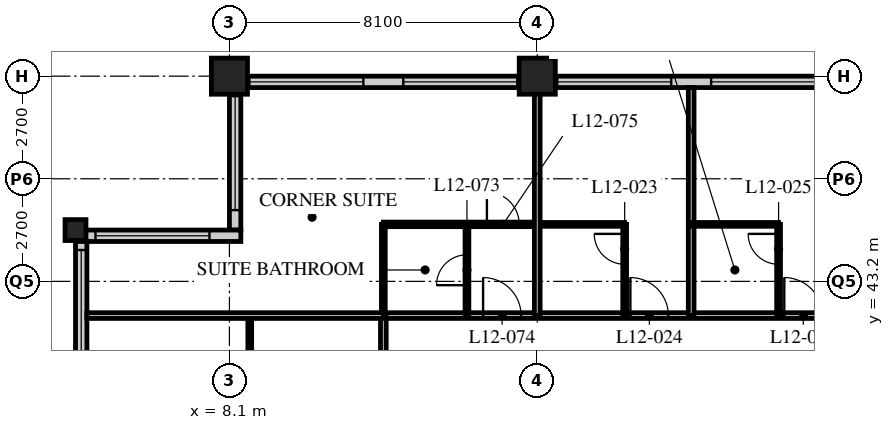
"""IFC4 building model, lengths in metres.
Left out: names, types, materials, properties, quantities, classifications, styles, units other than length and angle.
Written with IfcOpenShell. Run it as: python <this file> out.ifc"""

import sys

from ifc_helpers import new_model, si_unit, direction, frame, frame_2d, origin, origin_2d, place, context, subcontext, project, spatial, rectangle, hollow_rectangle, extrude, element, fill, save


model = new_model("IFC4")
c1 = context("Model", 3, precision=1e-05, world=origin(), true_north=direction((0.0, 1.0)))
c2 = subcontext(c1, "Body", "Model", "MODEL_VIEW")
j1 = project(units=[si_unit("LENGTHUNIT", "METRE"), si_unit("PLANEANGLEUNIT", "RADIAN")], contexts=[c1])
p1 = place(None, origin())
s1 = spatial("IfcSite", under=j1, at=p1, CompositionType="ELEMENT")
p2 = place(p1, origin())
s2 = spatial("IfcBuilding", under=s1, at=p2, CompositionType="ELEMENT")
p3 = place(p2, frame((0.0, 0.0, 53.4)))
s3 = spatial("IfcBuildingStorey", under=s2, at=p3, CompositionType="ELEMENT", Elevation=53.4)
p4 = place(p3, frame((4.05, 44.55, 0.0), z_axis=(0.0, 0.0, 1.0), x_axis=(1.0, 0.0, 0.0)))
e1 = element("IfcColumn", 1, at=p4, inside=s3, PredefinedType="COLUMN", context=c2, shape_type="SweptSolid", body=[
    extrude(hollow_rectangle(XDim=0.55, YDim=0.55, WallThickness=0.05, at=origin_2d()), origin(), (0.0, 0.0, 1.0), 3.4),
])
for number, where, z_axis, x_axis in (
    (2, (8.1, 48.6, 0.0), (0.0, 0.0, 1.0), (1.0, 0.0, 0.0)),
    (3, (16.2, 48.6, 0.0), (0.0, 0.0, 1.0), (1.0, 0.0, 0.0)),
):
    element("IfcColumn", number, at=place(p3, frame(where, z_axis=z_axis, x_axis=x_axis)), inside=s3, PredefinedType="COLUMN", context=c2, shape_type="SweptSolid", body=[
        extrude(hollow_rectangle(XDim=0.95, YDim=0.95, WallThickness=0.095, at=origin_2d()), origin(), (0.0, 0.0, 1.0), 3.4),
    ])
p5 = place(p3, frame((48.3, 48.45, 0.0), z_axis=(0.0, 0.0, 1.0), x_axis=(-1.0, 0.0, 0.0)))
e4 = element("IfcWall", 4, at=p5, inside=s3, PredefinedType="SOLIDWALL", context=c2, shape_type="SweptSolid", body=[
    extrude(rectangle(XDim=40.2, YDim=0.3, at=frame_2d((20.1, 0.0))), origin(), (0.0, 0.0, 1.0), 3.19),
])
p6 = place(p5, frame((0.225, 0.0, 0.9)))
e5 = element("IfcOpeningElement", 5, at=p6, cuts=e4, PredefinedType="OPENING", context=c2, shape_type="SweptSolid", body=[
    extrude(rectangle(XDim=3.0, YDim=2.0, at=frame_2d((1.5, 1.0))), frame((0.0, 0.16, 0.0), z_axis=(0.0, -1.0, 0.0), x_axis=(1.0, 0.0, 0.0)), (0.0, 0.0, 1.0), 0.32),
])
p7 = place(p5, frame((4.275, 0.0, 0.9)))
e6 = element("IfcOpeningElement", 6, at=p7, cuts=e4, PredefinedType="OPENING", context=c2, shape_type="SweptSolid", body=[
    extrude(rectangle(XDim=3.0, YDim=2.0, at=frame_2d((1.5, 1.0))), frame((0.0, 0.16, 0.0), z_axis=(0.0, -1.0, 0.0), x_axis=(1.0, 0.0, 0.0)), (0.0, 0.0, 1.0), 0.32),
])
p8 = place(p5, frame((8.325, 0.0, 0.9)))
e7 = element("IfcOpeningElement", 7, at=p8, cuts=e4, PredefinedType="OPENING", context=c2, shape_type="SweptSolid", body=[
    extrude(rectangle(XDim=3.0, YDim=2.0, at=frame_2d((1.5, 1.0))), frame((0.0, 0.16, 0.0), z_axis=(0.0, -1.0, 0.0), x_axis=(1.0, 0.0, 0.0)), (0.0, 0.0, 1.0), 0.32),
])
p9 = place(p5, frame((12.375, 0.0, 0.9)))
e8 = element("IfcOpeningElement", 8, at=p9, cuts=e4, PredefinedType="OPENING", context=c2, shape_type="SweptSolid", body=[
    extrude(rectangle(XDim=3.0, YDim=2.0, at=frame_2d((1.5, 1.0))), frame((0.0, 0.16, 0.0), z_axis=(0.0, -1.0, 0.0), x_axis=(1.0, 0.0, 0.0)), (0.0, 0.0, 1.0), 0.32),
])
p10 = place(p5, frame((16.425, 0.0, 0.9)))
e9 = element("IfcOpeningElement", 9, at=p10, cuts=e4, PredefinedType="OPENING", context=c2, shape_type="SweptSolid", body=[
    extrude(rectangle(XDim=3.0, YDim=2.0, at=frame_2d((1.5, 1.0))), frame((0.0, 0.16, 0.0), z_axis=(0.0, -1.0, 0.0), x_axis=(1.0, 0.0, 0.0)), (0.0, 0.0, 1.0), 0.32),
])
p11 = place(p5, frame((20.475, 0.0, 0.9)))
e10 = element("IfcOpeningElement", 10, at=p11, cuts=e4, PredefinedType="OPENING", context=c2, shape_type="SweptSolid", body=[
    extrude(rectangle(XDim=3.0, YDim=2.0, at=frame_2d((1.5, 1.0))), frame((0.0, 0.16, 0.0), z_axis=(0.0, -1.0, 0.0), x_axis=(1.0, 0.0, 0.0)), (0.0, 0.0, 1.0), 0.32),
])
p12 = place(p5, frame((24.525, 0.0, 0.9)))
e11 = element("IfcOpeningElement", 11, at=p12, cuts=e4, PredefinedType="OPENING", context=c2, shape_type="SweptSolid", body=[
    extrude(rectangle(XDim=3.0, YDim=2.0, at=frame_2d((1.5, 1.0))), frame((0.0, 0.16, 0.0), z_axis=(0.0, -1.0, 0.0), x_axis=(1.0, 0.0, 0.0)), (0.0, 0.0, 1.0), 0.32),
])
p13 = place(p5, frame((28.575, 0.0, 0.9)))
e12 = element("IfcOpeningElement", 12, at=p13, cuts=e4, PredefinedType="OPENING", context=c2, shape_type="SweptSolid", body=[
    extrude(rectangle(XDim=3.0, YDim=2.0, at=frame_2d((1.5, 1.0))), frame((0.0, 0.16, 0.0), z_axis=(0.0, -1.0, 0.0), x_axis=(1.0, 0.0, 0.0)), (0.0, 0.0, 1.0), 0.32),
])
p14 = place(p5, frame((32.625, 0.0, 0.9)))
e13 = element("IfcOpeningElement", 13, at=p14, cuts=e4, PredefinedType="OPENING", context=c2, shape_type="SweptSolid", body=[
    extrude(rectangle(XDim=3.0, YDim=2.0, at=frame_2d((1.5, 1.0))), frame((0.0, 0.16, 0.0), z_axis=(0.0, -1.0, 0.0), x_axis=(1.0, 0.0, 0.0)), (0.0, 0.0, 1.0), 0.32),
])
p15 = place(p5, frame((36.675, 0.0, 0.9)))
e14 = element("IfcOpeningElement", 14, at=p15, cuts=e4, PredefinedType="OPENING", context=c2, shape_type="SweptSolid", body=[
    extrude(rectangle(XDim=3.0, YDim=2.0, at=frame_2d((1.5, 1.0))), frame((0.0, 0.16, 0.0), z_axis=(0.0, -1.0, 0.0), x_axis=(1.0, 0.0, 0.0)), (0.0, 0.0, 1.0), 0.32),
])
p16 = place(p3, frame((8.25, 48.3, 0.0), z_axis=(0.0, 0.0, 1.0), x_axis=(0.0, -1.0, 0.0)))
e15 = element("IfcWall", 15, at=p16, inside=s3, PredefinedType="SOLIDWALL", context=c2, shape_type="SweptSolid", body=[
    extrude(rectangle(XDim=3.75, YDim=0.3, at=frame_2d((1.875, 0.0))), origin(), (0.0, 0.0, 1.0), 3.19),
])
p17 = place(p16, frame((0.225, 0.0, 0.9)))
e16 = element("IfcOpeningElement", 16, at=p17, cuts=e15, PredefinedType="OPENING", context=c2, shape_type="SweptSolid", body=[
    extrude(rectangle(XDim=3.0, YDim=1.5, at=frame_2d((1.5, 0.75))), frame((0.0, 0.16, 0.0), z_axis=(0.0, -1.0, 0.0), x_axis=(1.0, 0.0, 0.0)), (0.0, 0.0, 1.0), 0.32),
])
p18 = place(p3, frame((8.4, 44.4, 0.0), z_axis=(0.0, 0.0, 1.0), x_axis=(-1.0, 0.0, 0.0)))
e17 = element("IfcWall", 17, at=p18, inside=s3, PredefinedType="SOLIDWALL", context=c2, shape_type="SweptSolid", body=[
    extrude(rectangle(XDim=4.35, YDim=0.3, at=frame_2d((2.175, 0.0))), origin(), (0.0, 0.0, 1.0), 3.19),
])
p19 = place(p18, frame((0.825, 0.0, 0.9)))
e18 = element("IfcOpeningElement", 18, at=p19, cuts=e17, PredefinedType="OPENING", context=c2, shape_type="SweptSolid", body=[
    extrude(rectangle(XDim=3.0, YDim=1.5, at=frame_2d((1.5, 0.75))), frame((0.0, 0.16, 0.0), z_axis=(0.0, -1.0, 0.0), x_axis=(1.0, 0.0, 0.0)), (0.0, 0.0, 1.0), 0.32),
])
p20 = place(p3, frame((4.2, 44.25, 0.0), z_axis=(0.0, 0.0, 1.0), x_axis=(0.0, -1.0, 0.0)))
e19 = element("IfcWall", 19, at=p20, inside=s3, PredefinedType="SOLIDWALL", context=c2, shape_type="SweptSolid", body=[
    extrude(rectangle(XDim=3.75, YDim=0.3, at=frame_2d((1.875, 0.0))), origin(), (0.0, 0.0, 1.0), 3.19),
])
p21 = place(p20, frame((0.225, 0.0, 0.9)))
e20 = element("IfcOpeningElement", 20, at=p21, cuts=e19, PredefinedType="OPENING", context=c2, shape_type="SweptSolid", body=[
    extrude(rectangle(XDim=3.0, YDim=1.5, at=frame_2d((1.5, 0.75))), frame((0.0, 0.16, 0.0), z_axis=(0.0, -1.0, 0.0), x_axis=(1.0, 0.0, 0.0)), (0.0, 0.0, 1.0), 0.32),
])
p22 = place(p3, frame((12.15, 42.3, 0.0), z_axis=(0.0, 0.0, 1.0), x_axis=(1.0, 0.0, 0.0)))
e21 = element("IfcWall", 21, at=p22, inside=s3, PredefinedType="PARTITIONING", context=c2, shape_type="SweptSolid", body=[
    extrude(rectangle(XDim=32.4, YDim=0.15, at=frame_2d((16.2, 0.0))), origin(), (0.0, 0.0, 1.0), 3.19),
])
p23 = place(p22, frame((6.5, 0.0, 0.0)))
e22 = element("IfcOpeningElement", 22, at=p23, cuts=e21, PredefinedType="OPENING", context=c2, shape_type="SweptSolid", body=[
    extrude(rectangle(XDim=1.0, YDim=2.1, at=frame_2d((0.5, 1.05))), frame((0.0, 0.085, 0.0), z_axis=(0.0, -1.0, 0.0), x_axis=(1.0, 0.0, 0.0)), (0.0, 0.0, 1.0), 0.17),
])
p24 = place(p22, frame((10.55, 0.0, 0.0)))
e23 = element("IfcOpeningElement", 23, at=p24, cuts=e21, PredefinedType="OPENING", context=c2, shape_type="SweptSolid", body=[
    extrude(rectangle(XDim=1.0, YDim=2.1, at=frame_2d((0.5, 1.05))), frame((0.0, 0.085, 0.0), z_axis=(0.0, -1.0, 0.0), x_axis=(1.0, 0.0, 0.0)), (0.0, 0.0, 1.0), 0.17),
])
p25 = place(p22, frame((14.6, 0.0, 0.0)))
e24 = element("IfcOpeningElement", 24, at=p25, cuts=e21, PredefinedType="OPENING", context=c2, shape_type="SweptSolid", body=[
    extrude(rectangle(XDim=1.0, YDim=2.1, at=frame_2d((0.5, 1.05))), frame((0.0, 0.085, 0.0), z_axis=(0.0, -1.0, 0.0), x_axis=(1.0, 0.0, 0.0)), (0.0, 0.0, 1.0), 0.17),
])
p26 = place(p22, frame((18.65, 0.0, 0.0)))
e25 = element("IfcOpeningElement", 25, at=p26, cuts=e21, PredefinedType="OPENING", context=c2, shape_type="SweptSolid", body=[
    extrude(rectangle(XDim=1.0, YDim=2.1, at=frame_2d((0.5, 1.05))), frame((0.0, 0.085, 0.0), z_axis=(0.0, -1.0, 0.0), x_axis=(1.0, 0.0, 0.0)), (0.0, 0.0, 1.0), 0.17),
])
p27 = place(p22, frame((22.7, 0.0, 0.0)))
e26 = element("IfcOpeningElement", 26, at=p27, cuts=e21, PredefinedType="OPENING", context=c2, shape_type="SweptSolid", body=[
    extrude(rectangle(XDim=1.0, YDim=2.1, at=frame_2d((0.5, 1.05))), frame((0.0, 0.085, 0.0), z_axis=(0.0, -1.0, 0.0), x_axis=(1.0, 0.0, 0.0)), (0.0, 0.0, 1.0), 0.17),
])
p28 = place(p22, frame((26.75, 0.0, 0.0)))
e27 = element("IfcOpeningElement", 27, at=p28, cuts=e21, PredefinedType="OPENING", context=c2, shape_type="SweptSolid", body=[
    extrude(rectangle(XDim=1.0, YDim=2.1, at=frame_2d((0.5, 1.05))), frame((0.0, 0.085, 0.0), z_axis=(0.0, -1.0, 0.0), x_axis=(1.0, 0.0, 0.0)), (0.0, 0.0, 1.0), 0.17),
])
p29 = place(p22, frame((28.775, 0.0, 0.0)))
e28 = element("IfcOpeningElement", 28, at=p29, cuts=e21, PredefinedType="OPENING", context=c2, shape_type="SweptSolid", body=[
    extrude(rectangle(XDim=1.0, YDim=2.1, at=frame_2d((0.5, 1.05))), frame((0.0, 0.085, 0.0), z_axis=(0.0, -1.0, 0.0), x_axis=(1.0, 0.0, 0.0)), (0.0, 0.0, 1.0), 0.17),
])
p30 = place(p22, frame((2.625, 0.0, 0.0)))
e29 = element("IfcOpeningElement", 29, at=p30, cuts=e21, PredefinedType="OPENING", context=c2, shape_type="SweptSolid", body=[
    extrude(rectangle(XDim=1.0, YDim=2.1, at=frame_2d((0.5, 1.05))), frame((0.0, 0.085, 0.0), z_axis=(0.0, -1.0, 0.0), x_axis=(1.0, 0.0, 0.0)), (0.0, 0.0, 1.0), 0.17),
])
p31 = place(p3, frame((12.15, 12.15, 0.0), z_axis=(0.0, 0.0, 1.0), x_axis=(0.0, 1.0, 0.0)))
e30 = element("IfcWall", 30, at=p31, inside=s3, PredefinedType="PARTITIONING", context=c2, shape_type="SweptSolid", body=[
    extrude(rectangle(XDim=30.15, YDim=0.15, at=frame_2d((15.075, 0.0))), origin(), (0.0, 0.0, 1.0), 3.19),
])
p32 = place(p31, frame((2.45, 0.0, 0.0)))
e31 = element("IfcOpeningElement", 31, at=p32, cuts=e30, PredefinedType="OPENING", context=c2, shape_type="SweptSolid", body=[
    extrude(rectangle(XDim=1.0, YDim=2.1, at=frame_2d((0.5, 1.05))), frame((0.0, 0.085, 0.0), z_axis=(0.0, -1.0, 0.0), x_axis=(1.0, 0.0, 0.0)), (0.0, 0.0, 1.0), 0.17),
])
p33 = place(p31, frame((6.5, 0.0, 0.0)))
e32 = element("IfcOpeningElement", 32, at=p33, cuts=e30, PredefinedType="OPENING", context=c2, shape_type="SweptSolid", body=[
    extrude(rectangle(XDim=1.0, YDim=2.1, at=frame_2d((0.5, 1.05))), frame((0.0, 0.085, 0.0), z_axis=(0.0, -1.0, 0.0), x_axis=(1.0, 0.0, 0.0)), (0.0, 0.0, 1.0), 0.17),
])
p34 = place(p31, frame((10.55, 0.0, 0.0)))
e33 = element("IfcOpeningElement", 33, at=p34, cuts=e30, PredefinedType="OPENING", context=c2, shape_type="SweptSolid", body=[
    extrude(rectangle(XDim=1.0, YDim=2.1, at=frame_2d((0.5, 1.05))), frame((0.0, 0.085, 0.0), z_axis=(0.0, -1.0, 0.0), x_axis=(1.0, 0.0, 0.0)), (0.0, 0.0, 1.0), 0.17),
])
p35 = place(p31, frame((14.6, 0.0, 0.0)))
e34 = element("IfcOpeningElement", 34, at=p35, cuts=e30, PredefinedType="OPENING", context=c2, shape_type="SweptSolid", body=[
    extrude(rectangle(XDim=1.0, YDim=2.1, at=frame_2d((0.5, 1.05))), frame((0.0, 0.085, 0.0), z_axis=(0.0, -1.0, 0.0), x_axis=(1.0, 0.0, 0.0)), (0.0, 0.0, 1.0), 0.17),
])
p36 = place(p31, frame((21.65, 0.0, 0.0)))
e35 = element("IfcOpeningElement", 35, at=p36, cuts=e30, PredefinedType="OPENING", context=c2, shape_type="SweptSolid", body=[
    extrude(rectangle(XDim=1.0, YDim=2.1, at=frame_2d((0.5, 1.05))), frame((0.0, 0.085, 0.0), z_axis=(0.0, -1.0, 0.0), x_axis=(1.0, 0.0, 0.0)), (0.0, 0.0, 1.0), 0.17),
])
p37 = place(p31, frame((26.7, 0.0, 0.0)))
e36 = element("IfcOpeningElement", 36, at=p37, cuts=e30, PredefinedType="OPENING", context=c2, shape_type="SweptSolid", body=[
    extrude(rectangle(XDim=1.0, YDim=2.1, at=frame_2d((0.5, 1.05))), frame((0.0, 0.085, 0.0), z_axis=(0.0, -1.0, 0.0), x_axis=(1.0, 0.0, 0.0)), (0.0, 0.0, 1.0), 0.17),
])
p38 = place(p3, frame((16.2, 44.7, 0.0), z_axis=(0.0, 0.0, 1.0), x_axis=(1.0, 0.0, 0.0)))
e37 = element("IfcWall", 37, at=p38, inside=s3, PredefinedType="PARTITIONING", context=c2, shape_type="SweptSolid", body=[
    extrude(rectangle(XDim=2.3, YDim=0.1, at=frame_2d((1.15, 0.0))), origin(), (0.0, 0.0, 1.0), 3.19),
])
p39 = place(p3, frame((18.5, 42.3, 0.0), z_axis=(0.0, 0.0, 1.0), x_axis=(0.0, 1.0, 0.0)))
e38 = element("IfcWall", 38, at=p39, inside=s3, PredefinedType="PARTITIONING", context=c2, shape_type="SweptSolid", body=[
    extrude(rectangle(XDim=2.4, YDim=0.1, at=frame_2d((1.2, 0.0))), origin(), (0.0, 0.0, 1.0), 3.19),
])
p40 = place(p39, frame((1.35, 0.0, 0.0)))
e39 = element("IfcOpeningElement", 39, at=p40, cuts=e38, PredefinedType="OPENING", context=c2, shape_type="SweptSolid", body=[
    extrude(rectangle(XDim=0.8, YDim=2.1, at=frame_2d((0.4, 1.05))), frame((0.0, 0.06, 0.0), z_axis=(0.0, -1.0, 0.0), x_axis=(1.0, 0.0, 0.0)), (0.0, 0.0, 1.0), 0.12),
])
p41 = place(p3, frame((20.25, 42.3, 0.0), z_axis=(0.0, 0.0, 1.0), x_axis=(0.0, 1.0, 0.0)))
e40 = element("IfcWall", 40, at=p41, inside=s3, PredefinedType="PARTITIONING", context=c2, shape_type="SweptSolid", body=[
    extrude(rectangle(XDim=6.0, YDim=0.15, at=frame_2d((3.0, 0.0))), origin(), (0.0, 0.0, 1.0), 3.19),
])
p42 = place(p3, frame((20.25, 44.7, 0.0), z_axis=(0.0, 0.0, 1.0), x_axis=(1.0, 0.0, 0.0)))
e41 = element("IfcWall", 41, at=p42, inside=s3, PredefinedType="PARTITIONING", context=c2, shape_type="SweptSolid", body=[
    extrude(rectangle(XDim=2.3, YDim=0.1, at=frame_2d((1.15, 0.0))), origin(), (0.0, 0.0, 1.0), 3.19),
])
p43 = place(p3, frame((22.55, 42.3, 0.0), z_axis=(0.0, 0.0, 1.0), x_axis=(0.0, 1.0, 0.0)))
e42 = element("IfcWall", 42, at=p43, inside=s3, PredefinedType="PARTITIONING", context=c2, shape_type="SweptSolid", body=[
    extrude(rectangle(XDim=2.4, YDim=0.1, at=frame_2d((1.2, 0.0))), origin(), (0.0, 0.0, 1.0), 3.19),
])
p44 = place(p43, frame((1.35, 0.0, 0.0)))
e43 = element("IfcOpeningElement", 43, at=p44, cuts=e42, PredefinedType="OPENING", context=c2, shape_type="SweptSolid", body=[
    extrude(rectangle(XDim=0.8, YDim=2.1, at=frame_2d((0.4, 1.05))), frame((0.0, 0.06, 0.0), z_axis=(0.0, -1.0, 0.0), x_axis=(1.0, 0.0, 0.0)), (0.0, 0.0, 1.0), 0.12),
])
p45 = place(p3, frame((8.635, 40.0, 0.0), z_axis=(0.0, 0.0, 1.0), x_axis=(0.0, 1.0, 0.0)))
e44 = element("IfcWall", 44, at=p45, inside=s3, PredefinedType="PARTITIONING", context=c2, shape_type="SweptSolid", body=[
    extrude(rectangle(XDim=2.3, YDim=0.1, at=frame_2d((1.15, 0.0))), origin(), (0.0, 0.0, 1.0), 3.19),
])
p46 = place(p3, frame((12.15, 44.7, 0.0), z_axis=(0.0, 0.0, 1.0), x_axis=(1.0, 0.0, 0.0)))
e45 = element("IfcWall", 45, at=p46, inside=s3, PredefinedType="PARTITIONING", context=c2, shape_type="SweptSolid", body=[
    extrude(rectangle(XDim=4.05, YDim=0.12, at=frame_2d((2.025, 0.0))), origin(), (0.0, 0.0, 1.0), 3.19),
])
p47 = place(p46, frame((2.725, 0.0, 0.0)))
e46 = element("IfcOpeningElement", 46, at=p47, cuts=e45, PredefinedType="OPENING", context=c2, shape_type="SweptSolid", body=[
    extrude(rectangle(XDim=0.85, YDim=2.1, at=frame_2d((0.425, 1.05))), frame((0.0, 0.07, 0.0), z_axis=(0.0, -1.0, 0.0), x_axis=(1.0, 0.0, 0.0)), (0.0, 0.0, 1.0), 0.14),
])
p48 = place(p3, frame((14.35, 42.3, 0.0), z_axis=(0.0, 0.0, 1.0), x_axis=(0.0, 1.0, 0.0)))
e47 = element("IfcWall", 47, at=p48, inside=s3, PredefinedType="PARTITIONING", context=c2, shape_type="SweptSolid", body=[
    extrude(rectangle(XDim=2.4, YDim=0.1, at=frame_2d((1.2, 0.0))), origin(), (0.0, 0.0, 1.0), 3.19),
])
p49 = place(p48, frame((0.8, 0.0, 0.0)))
e48 = element("IfcOpeningElement", 48, at=p49, cuts=e47, PredefinedType="OPENING", context=c2, shape_type="SweptSolid", body=[
    extrude(rectangle(XDim=0.8, YDim=2.1, at=frame_2d((0.4, 1.05))), frame((0.0, 0.06, 0.0), z_axis=(0.0, -1.0, 0.0), x_axis=(1.0, 0.0, 0.0)), (0.0, 0.0, 1.0), 0.12),
])
p50 = place(p3, frame((12.15, 42.3, 0.0), z_axis=(0.0, 0.0, 1.0), x_axis=(0.0, 1.0, 0.0)))
e49 = element("IfcWall", 49, at=p50, inside=s3, PredefinedType="PARTITIONING", context=c2, shape_type="SweptSolid", body=[
    extrude(rectangle(XDim=2.4, YDim=0.1, at=frame_2d((1.2, 0.0))), origin(), (0.0, 0.0, 1.0), 3.19),
])
p51 = place(p3, frame((4.35, 42.3, 0.0), z_axis=(0.0, 0.0, 1.0), x_axis=(1.0, 0.0, 0.0)))
e50 = element("IfcWall", 50, at=p51, inside=s3, PredefinedType="PARTITIONING", context=c2, shape_type="SweptSolid", body=[
    extrude(rectangle(XDim=7.8, YDim=0.15, at=frame_2d((3.9, 0.0))), origin(), (0.0, 0.0, 1.0), 3.19),
])
p52 = place(p3, frame((16.2, 42.3, 0.0), z_axis=(0.0, 0.0, 1.0), x_axis=(0.0, 1.0, 0.0)))
e51 = element("IfcWall", 51, at=p52, inside=s3, PredefinedType="PARTITIONING", context=c2, shape_type="SweptSolid", body=[
    extrude(rectangle(XDim=6.0, YDim=0.15, at=frame_2d((3.0, 0.0))), origin(), (0.0, 0.0, 1.0), 2.578),
])
p53 = place(p12, origin())
e52 = element("IfcWindow", 52, at=p53, inside=s3, PartitioningType="SINGLE_PANEL", PredefinedType="WINDOW", context=c2, shape_type="SweptSolid", body=[
    extrude(rectangle(XDim=3.0, YDim=2.0, at=frame_2d((1.5, 1.0))), frame((0.0, 0.03, 0.0), z_axis=(0.0, -1.0, 0.0), x_axis=(1.0, 0.0, 0.0)), (0.0, 0.0, 1.0), 0.06),
])
fill(e11, e52)
p54 = place(p13, origin())
e53 = element("IfcWindow", 53, at=p54, inside=s3, PartitioningType="SINGLE_PANEL", PredefinedType="WINDOW", context=c2, shape_type="SweptSolid", body=[
    extrude(rectangle(XDim=3.0, YDim=2.0, at=frame_2d((1.5, 1.0))), frame((0.0, 0.03, 0.0), z_axis=(0.0, -1.0, 0.0), x_axis=(1.0, 0.0, 0.0)), (0.0, 0.0, 1.0), 0.06),
])
fill(e12, e53)
p55 = place(p14, origin())
e54 = element("IfcWindow", 54, at=p55, inside=s3, PartitioningType="SINGLE_PANEL", PredefinedType="WINDOW", context=c2, shape_type="SweptSolid", body=[
    extrude(rectangle(XDim=3.0, YDim=2.0, at=frame_2d((1.5, 1.0))), frame((0.0, 0.03, 0.0), z_axis=(0.0, -1.0, 0.0), x_axis=(1.0, 0.0, 0.0)), (0.0, 0.0, 1.0), 0.06),
])
fill(e13, e54)
p56 = place(p15, origin())
e55 = element("IfcWindow", 55, at=p56, inside=s3, PartitioningType="SINGLE_PANEL", PredefinedType="WINDOW", context=c2, shape_type="SweptSolid", body=[
    extrude(rectangle(XDim=3.0, YDim=2.0, at=frame_2d((1.5, 1.0))), frame((0.0, 0.03, 0.0), z_axis=(0.0, -1.0, 0.0), x_axis=(1.0, 0.0, 0.0)), (0.0, 0.0, 1.0), 0.06),
])
fill(e14, e55)
p57 = place(p17, origin())
e56 = element("IfcWindow", 56, at=p57, inside=s3, PartitioningType="SINGLE_PANEL", PredefinedType="WINDOW", context=c2, shape_type="SweptSolid", body=[
    extrude(rectangle(XDim=3.0, YDim=1.5, at=frame_2d((1.5, 0.75))), frame((0.0, 0.03, 0.0), z_axis=(0.0, -1.0, 0.0), x_axis=(1.0, 0.0, 0.0)), (0.0, 0.0, 1.0), 0.06),
])
fill(e16, e56)
p58 = place(p19, origin())
e57 = element("IfcWindow", 57, at=p58, inside=s3, PartitioningType="SINGLE_PANEL", PredefinedType="WINDOW", context=c2, shape_type="SweptSolid", body=[
    extrude(rectangle(XDim=3.0, YDim=1.5, at=frame_2d((1.5, 0.75))), frame((0.0, 0.03, 0.0), z_axis=(0.0, -1.0, 0.0), x_axis=(1.0, 0.0, 0.0)), (0.0, 0.0, 1.0), 0.06),
])
fill(e18, e57)
p59 = place(p21, origin())
e58 = element("IfcWindow", 58, at=p59, inside=s3, PartitioningType="SINGLE_PANEL", PredefinedType="WINDOW", context=c2, shape_type="SweptSolid", body=[
    extrude(rectangle(XDim=3.0, YDim=1.5, at=frame_2d((1.5, 0.75))), frame((0.0, 0.03, 0.0), z_axis=(0.0, -1.0, 0.0), x_axis=(1.0, 0.0, 0.0)), (0.0, 0.0, 1.0), 0.06),
])
fill(e20, e58)
p60 = place(p40, origin())
e59 = element("IfcDoor", 59, at=p60, inside=s3, OperationType="SINGLE_SWING_RIGHT", PredefinedType="DOOR", context=c2, shape_type="SweptSolid", body=[
    extrude(rectangle(XDim=0.8, YDim=2.1, at=frame_2d((0.4, 1.05))), frame((0.0, 0.025, 0.0), z_axis=(0.0, -1.0, 0.0), x_axis=(1.0, 0.0, 0.0)), (0.0, 0.0, 1.0), 0.05),
])
fill(e39, e59)
p61 = place(p23, origin())
e60 = element("IfcDoor", 60, at=p61, inside=s3, OperationType="SINGLE_SWING_LEFT", PredefinedType="DOOR", context=c2, shape_type="SweptSolid", body=[
    extrude(rectangle(XDim=1.0, YDim=2.1, at=frame_2d((0.5, 1.05))), frame((0.0, 0.025, 0.0), z_axis=(0.0, -1.0, 0.0), x_axis=(1.0, 0.0, 0.0)), (0.0, 0.0, 1.0), 0.05),
])
fill(e22, e60)
p62 = place(p44, origin())
e61 = element("IfcDoor", 61, at=p62, inside=s3, OperationType="SINGLE_SWING_RIGHT", PredefinedType="DOOR", context=c2, shape_type="SweptSolid", body=[
    extrude(rectangle(XDim=0.8, YDim=2.1, at=frame_2d((0.4, 1.05))), frame((0.0, 0.025, 0.0), z_axis=(0.0, -1.0, 0.0), x_axis=(1.0, 0.0, 0.0)), (0.0, 0.0, 1.0), 0.05),
])
fill(e43, e61)
p63 = place(p24, origin())
e62 = element("IfcDoor", 62, at=p63, inside=s3, OperationType="SINGLE_SWING_LEFT", PredefinedType="DOOR", context=c2, shape_type="SweptSolid", body=[
    extrude(rectangle(XDim=1.0, YDim=2.1, at=frame_2d((0.5, 1.05))), frame((0.0, 0.025, 0.0), z_axis=(0.0, -1.0, 0.0), x_axis=(1.0, 0.0, 0.0)), (0.0, 0.0, 1.0), 0.05),
])
fill(e23, e62)
p64 = place(p49, origin())
e63 = element("IfcDoor", 63, at=p64, inside=s3, OperationType="SINGLE_SWING_LEFT", PredefinedType="DOOR", context=c2, shape_type="SweptSolid", body=[
    extrude(rectangle(XDim=0.8, YDim=2.1, at=frame_2d((0.4, 1.05))), frame((0.0, 0.025, 0.0), z_axis=(0.0, -1.0, 0.0), x_axis=(1.0, 0.0, 0.0)), (0.0, 0.0, 1.0), 0.05),
])
fill(e48, e63)
p65 = place(p30, origin())
e64 = element("IfcDoor", 64, at=p65, inside=s3, OperationType="SINGLE_SWING_LEFT", PredefinedType="DOOR", context=c2, shape_type="SweptSolid", body=[
    extrude(rectangle(XDim=1.0, YDim=2.1, at=frame_2d((0.5, 1.05))), frame((0.0, 0.025, 0.0), z_axis=(0.0, -1.0, 0.0), x_axis=(1.0, 0.0, 0.0)), (0.0, 0.0, 1.0), 0.05),
])
fill(e29, e64)
p66 = place(p47, origin())
e65 = element("IfcDoor", 65, at=p66, inside=s3, OperationType="SINGLE_SWING_LEFT", PredefinedType="DOOR", context=c2, shape_type="SweptSolid", body=[
    extrude(rectangle(XDim=0.85, YDim=2.1, at=frame_2d((0.425, 1.05))), frame((0.0, 0.025, 0.0), z_axis=(0.0, -1.0, 0.0), x_axis=(1.0, 0.0, 0.0)), (0.0, 0.0, 1.0), 0.05),
])
fill(e46, e65)
save(model, sys.argv[1])
